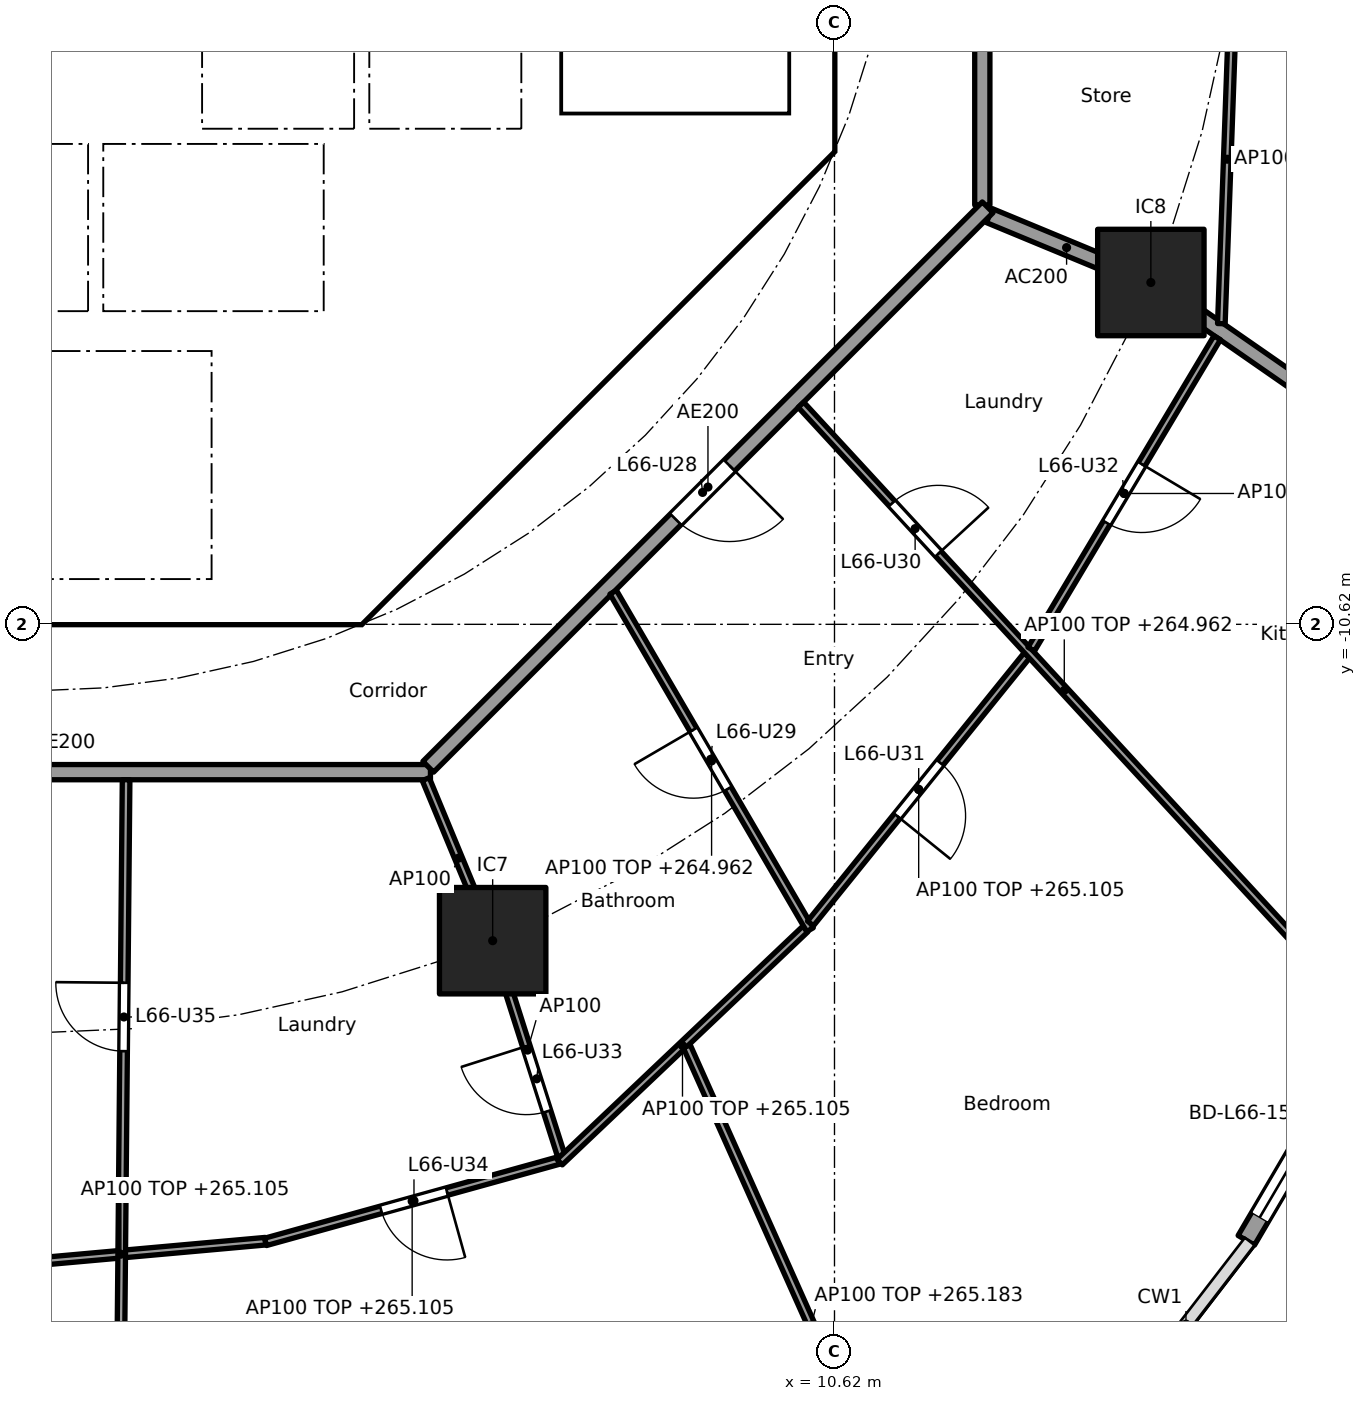
"""IFC4 building model, lengths in metres.
Left out: names, types, materials, properties, quantities, classifications, styles, units other than length and angle.
Written with IfcOpenShell. Run it as: python <this file> out.ifc"""

import sys

from ifc_helpers import new_model, si_unit, direction, frame, frame_2d, origin, origin_2d, place, context, subcontext, project, spatial, polyline, rectangle, outline, extrude, element, fill, save


model = new_model("IFC4")
c1 = context("Model", 3, precision=1e-05, world=origin(), true_north=direction((0.0, 1.0)))
c2 = subcontext(c1, "Body", "Model", "MODEL_VIEW")
j1 = project(units=[si_unit("LENGTHUNIT", "METRE"), si_unit("PLANEANGLEUNIT", "RADIAN")], contexts=[c1])
p1 = place(None, origin())
s1 = spatial("IfcSite", under=j1, at=p1, CompositionType="ELEMENT")
p2 = place(p1, origin())
s2 = spatial("IfcBuilding", under=s1, at=p2, CompositionType="ELEMENT")
p3 = place(p2, frame((0.0, 0.0, 262.2)))
s3 = spatial("IfcBuildingStorey", under=s2, at=p3, CompositionType="ELEMENT", Elevation=262.2)
for number, where, z_axis, x_axis in (
    (1, (6.123, -14.782, 0.0), (0.0, 0.0, 1.0), (1.0, 0.0, 0.0)),
    (2, (14.782, -6.123, 0.0), (0.0, 0.0, 1.0), (1.0, 0.0, 0.0)),
):
    element("IfcColumn", number, at=place(p3, frame(where, z_axis=z_axis, x_axis=x_axis)), inside=s3, PredefinedType="COLUMN", context=c2, shape_type="SweptSolid", body=[
        extrude(rectangle(XDim=1.4, YDim=1.4, at=origin_2d()), origin(), (0.0, 0.0, 1.0), 3.7),
    ])
p4 = place(p3, frame((17.454, -16.312, 0.0), z_axis=(0.0, 0.0, 1.0), x_axis=(-0.506371364425, -0.862315511452, 0.0)))
e3 = element("IfcWall", 3, at=p4, inside=s3, PredefinedType="SOLIDWALL", context=c2, shape_type="SweptSolid", body=[
    extrude(rectangle(XDim=2.796, YDim=0.25, at=frame_2d((1.398, 0.0))), origin(), (0.0, 0.0, 1.0), 3.44),
])
p5 = place(p4, frame((0.348, 0.0, 0.0)))
e4 = element("IfcOpeningElement", 4, at=p5, cuts=e3, PredefinedType="OPENING", context=c2, shape_type="SweptSolid", body=[
    extrude(rectangle(XDim=2.1, YDim=2.4, at=frame_2d((1.05, 1.2))), frame((0.0, 0.135, 0.0), z_axis=(0.0, -1.0, 0.0), x_axis=(1.0, 0.0, 0.0)), (0.0, 0.0, 1.0), 0.27),
])
p6 = place(p3, frame((4.613, -9.988, 0.0), z_axis=(0.0, 0.0, 1.0), x_axis=(0.707106781187, 0.707106781187, 0.0)))
e5 = element("IfcWall", 5, at=p6, inside=s3, PredefinedType="SHEAR", context=c2, shape_type="SweptSolid", body=[
    extrude(rectangle(XDim=7.602, YDim=0.6, at=frame_2d((3.801, 0.0))), origin(), (0.0, 0.0, 1.0), 3.44),
])
p7 = place(p6, frame((3.201, 0.0, 0.0)))
e6 = element("IfcOpeningElement", 6, at=p7, cuts=e5, PredefinedType="OPENING", context=c2, shape_type="SweptSolid", body=[
    extrude(rectangle(XDim=1.2, YDim=2.1, at=frame_2d((0.6, 1.05))), frame((0.0, 0.31, 0.0), z_axis=(0.0, -1.0, 0.0), x_axis=(1.0, 0.0, 0.0)), (0.0, 0.0, 1.0), 0.62),
])
p8 = place(p3, frame((4.0, -10.025, 0.0), z_axis=(0.0, 0.0, 1.0), x_axis=(0.0, 1.0, 0.0)))
e7 = element("IfcWall", 7, at=p8, inside=s3, PredefinedType="SOLIDWALL", context=c2, shape_type="SweptSolid", body=[
    extrude(rectangle(XDim=3.0, YDim=0.2, at=frame_2d((1.5, 0.0))), origin(), (0.0, 0.0, 1.0), 3.44),
])
p9 = place(p8, frame((0.975, 0.0, 0.0)))
e8 = element("IfcOpeningElement", 8, at=p9, cuts=e7, PredefinedType="OPENING", context=c2, shape_type="SweptSolid", body=[
    extrude(rectangle(XDim=1.1, YDim=2.1, at=frame_2d((0.55, 1.05))), frame((0.0, 0.11, 0.0), z_axis=(0.0, -1.0, 0.0), x_axis=(1.0, 0.0, 0.0)), (0.0, 0.0, 1.0), 0.22),
])
p10 = place(p3, frame((4.0, -6.5, 0.0), z_axis=(0.0, 0.0, 1.0), x_axis=(0.0, 1.0, 0.0)))
e9 = element("IfcWall", 9, at=p10, inside=s3, PredefinedType="SOLIDWALL", context=c2, shape_type="SweptSolid", body=[
    extrude(rectangle(XDim=2.2, YDim=0.2, at=frame_2d((1.1, 0.0))), origin(), (0.0, 0.0, 1.0), 3.44),
])
p11 = place(p10, frame((0.55, 0.0, 0.0)))
e10 = element("IfcOpeningElement", 10, at=p11, cuts=e9, PredefinedType="OPENING", context=c2, shape_type="SweptSolid", body=[
    extrude(rectangle(XDim=1.1, YDim=2.1, at=frame_2d((0.55, 1.05))), frame((0.0, 0.11, 0.0), z_axis=(0.0, -1.0, 0.0), x_axis=(1.0, 0.0, 0.0)), (0.0, 0.0, 1.0), 0.22),
])
p12 = place(p3, origin())
e11 = element("IfcWall", 11, at=p12, inside=s3, PredefinedType="SHEAR", context=c2, shape_type="SweptSolid", body=[
    extrude(outline(polyline([(-4.152, -10.025), (4.152, -10.025), (4.401, -9.776), (4.825, -10.2), (4.401, -10.625), (-4.401, -10.625), (-4.825, -10.2), (-4.401, -9.776), (-4.152, -10.025)])), origin(), (0.0, 0.0, 1.0), 3.44),
])
p13 = place(p3, origin())
e12 = element("IfcWall", 12, at=p13, inside=s3, PredefinedType="SHEAR", context=c2, shape_type="SweptSolid", body=[
    extrude(outline(polyline([(9.776, -4.401), (10.025, -4.152), (10.025, -3.801), (10.025, 4.152), (9.776, 4.401), (10.2, 4.825), (10.625, 4.401), (10.625, -4.401), (10.2, -4.825), (9.776, -4.401)])), origin(), (0.0, 0.0, 1.0), 3.44),
])
p14 = place(p3, frame((0.9, -6.5, 0.0), z_axis=(0.0, 0.0, 1.0), x_axis=(0.0, 1.0, 0.0)))
e13 = element("IfcWall", 13, at=p14, inside=s3, PredefinedType="SOLIDWALL", context=c2, shape_type="SweptSolid", body=[
    extrude(rectangle(XDim=2.2, YDim=0.2, at=frame_2d((1.1, 0.0))), origin(), (0.0, 0.0, 1.0), 3.44),
])
p15 = place(p3, origin())
e14 = element("IfcWall", 14, at=p15, inside=s3, PredefinedType="SOLIDWALL", context=c2, shape_type="SweptSolid", body=[
    extrude(outline(polyline([(-6.7, -2.1), (-6.5, -2.1), (-6.5, -4.1), (-2.3, -4.1), (-2.3, -2.1), (-2.1, -2.1), (-2.1, -4.1), (2.1, -4.1), (2.1, -2.1), (2.3, -2.1), (2.3, -4.1), (4.3, -4.1), (4.3, -2.1), (4.5, -2.1), (4.5, -4.1), (6.5, -4.1), (6.5, -2.1), (6.7, -2.1), (6.7, -4.3), (-6.7, -4.3), (-6.7, -2.1)])), origin(), (0.0, 0.0, 1.0), 3.44),
])
p16 = place(p3, origin())
e15 = element("IfcWall", 15, at=p16, inside=s3, PredefinedType="SOLIDWALL", context=c2, shape_type="SweptSolid", body=[
    extrude(outline(polyline([(4.1, -7.025), (-4.1, -7.025), (-4.1, -6.5), (4.1, -6.5), (4.1, -7.025)])), origin(), (0.0, 0.0, 1.0), 3.44),
])
p17 = place(p3, origin())
e16 = element("IfcWall", 16, at=p17, inside=s3, PredefinedType="SOLIDWALL", context=c2, shape_type="SweptSolid", body=[
    extrude(outline(polyline([(7.025, -3.9), (6.7, -3.9), (6.7, 3.9), (7.025, 3.9), (7.025, -3.9)])), origin(), (0.0, 0.0, 1.0), 3.44),
])
p18 = place(p3, origin())
e17 = element("IfcWall", 17, at=p18, inside=s3, PredefinedType="SOLIDWALL", context=c2, shape_type="SweptSolid", body=[
    extrude(outline(polyline([(10.025, -4.1), (6.7, -4.1), (6.7, -3.9), (10.025, -3.9), (10.025, -4.1)])), origin(), (0.0, 0.0, 1.0), 3.44),
])
p19 = place(p3, frame((12.657, -5.243, 0.0), z_axis=(0.0, 0.0, 1.0), x_axis=(0.92383017907, -0.382802560388, 0.0)))
e18 = element("IfcWall", 18, at=p19, inside=s3, PredefinedType="PARTITIONING", context=c2, shape_type="SweptSolid", body=[
    extrude(rectangle(XDim=2.2, YDim=0.2, at=frame_2d((1.1, 0.0))), origin(), (0.0, 0.0, 1.0), 3.44),
])
p20 = place(p3, frame((14.823, -6.151, 0.0), z_axis=(0.0, 0.0, 1.0), x_axis=(0.821435065081, -0.570302054928, 0.0)))
e19 = element("IfcWall", 19, at=p20, inside=s3, PredefinedType="PARTITIONING", context=c2, shape_type="SweptSolid", body=[
    extrude(rectangle(XDim=5.368, YDim=0.2, at=frame_2d((2.684, 0.0))), origin(), (0.0, 0.0, 1.0), 3.44),
])
p21 = place(p3, frame((12.565, -5.104, 0.0), z_axis=(0.0, 0.0, 1.0), x_axis=(0.0, 1.0, 0.0)))
e20 = element("IfcWall", 20, at=p21, inside=s3, PredefinedType="PARTITIONING", context=c2, shape_type="SweptSolid", body=[
    extrude(rectangle(XDim=10.209, YDim=0.2, at=frame_2d((5.104, 0.0))), origin(), (0.0, 0.0, 1.0), 3.44),
])
p22 = place(p21, frame((4.604, 0.0, 0.0)))
e21 = element("IfcOpeningElement", 21, at=p22, cuts=e20, PredefinedType="OPENING", context=c2, shape_type="SweptSolid", body=[
    extrude(rectangle(XDim=1.0, YDim=2.1, at=frame_2d((0.5, 1.05))), frame((0.0, 0.11, 0.0), z_axis=(0.0, -1.0, 0.0), x_axis=(1.0, 0.0, 0.0)), (0.0, 0.0, 1.0), 0.22),
])
p23 = place(p3, frame((-5.104, -12.565, 0.0), z_axis=(0.0, 0.0, 1.0), x_axis=(1.0, 0.0, 0.0)))
e22 = element("IfcWall", 22, at=p23, inside=s3, PredefinedType="PARTITIONING", context=c2, shape_type="SweptSolid", body=[
    extrude(rectangle(XDim=10.409, YDim=0.2, at=frame_2d((5.205, 0.0))), origin(), (0.0, 0.0, 1.0), 3.44),
])
p24 = place(p3, frame((5.275, -12.494, 0.0), z_axis=(0.0, 0.0, 1.0), x_axis=(0.707106781187, 0.707106781187, 0.0)))
e23 = element("IfcWall", 23, at=p24, inside=s3, PredefinedType="PARTITIONING", context=c2, shape_type="SweptSolid", body=[
    extrude(rectangle(XDim=10.409, YDim=0.2, at=frame_2d((5.205, 0.0))), origin(), (0.0, 0.0, 1.0), 3.44),
])
p25 = place(p24, frame((4.604, 0.0, 0.0)))
e24 = element("IfcOpeningElement", 24, at=p25, cuts=e23, PredefinedType="OPENING", context=c2, shape_type="SweptSolid", body=[
    extrude(rectangle(XDim=1.0, YDim=2.1, at=frame_2d((0.5, 1.05))), frame((0.0, 0.11, 0.0), z_axis=(0.0, -1.0, 0.0), x_axis=(1.0, 0.0, 0.0)), (0.0, 0.0, 1.0), 0.22),
])
p26 = place(p3, frame((15.865, -2.338, 0.0), z_axis=(0.0, 0.0, 1.0), x_axis=(-0.035864509465, -0.999356661538, 0.0)))
e25 = element("IfcWall", 25, at=p26, inside=s3, PredefinedType="PARTITIONING", context=c2, shape_type="SweptSolid", body=[
    extrude(rectangle(XDim=4.329, YDim=0.1, at=frame_2d((2.165, 0.0))), origin(), (0.0, 0.0, 1.0), 2.905),
])
p27 = place(p3, frame((-0.67, -19.077, 0.0), z_axis=(0.0, 0.0, 1.0), x_axis=(0.995986472869, 0.089503887414, 0.0)))
e26 = element("IfcWall", 26, at=p27, inside=s3, PredefinedType="PARTITIONING", context=c2, shape_type="SweptSolid", body=[
    extrude(rectangle(XDim=3.819, YDim=0.1, at=frame_2d((1.909, 0.0))), origin(), (0.0, 0.0, 1.0), 2.905),
])
p28 = place(p3, frame((1.3, -12.665, 0.0), z_axis=(0.0, 0.0, 1.0), x_axis=(-0.009254890166, -0.999957172587, 0.0)))
e27 = element("IfcWall", 27, at=p28, inside=s3, PredefinedType="PARTITIONING", context=c2, shape_type="SweptSolid", body=[
    extrude(rectangle(XDim=15.933, YDim=0.1, at=frame_2d((7.967, 0.0))), origin(), (0.0, 0.0, 1.0), 2.762),
])
p29 = place(p28, frame((2.671, 0.0, 0.0)))
e28 = element("IfcOpeningElement", 28, at=p29, cuts=e27, PredefinedType="OPENING", context=c2, shape_type="SweptSolid", body=[
    extrude(rectangle(XDim=0.9, YDim=2.1, at=frame_2d((0.45, 1.05))), frame((0.0, 0.06, 0.0), z_axis=(0.0, -1.0, 0.0), x_axis=(1.0, 0.0, 0.0)), (0.0, 0.0, 1.0), 0.12),
])
p30 = place(p3, frame((3.135, -18.744, 0.0), z_axis=(0.0, 0.0, 1.0), x_axis=(0.963606111552, 0.267326133738, 0.0)))
e29 = element("IfcWall", 29, at=p30, inside=s3, PredefinedType="PARTITIONING", context=c2, shape_type="SweptSolid", body=[
    extrude(rectangle(XDim=4.003, YDim=0.1, at=frame_2d((2.001, 0.0))), origin(), (0.0, 0.0, 1.0), 2.905),
])
p31 = place(p30, frame((1.576, 0.0, 0.0)))
e30 = element("IfcOpeningElement", 30, at=p31, cuts=e29, PredefinedType="OPENING", context=c2, shape_type="SweptSolid", body=[
    extrude(rectangle(XDim=0.9, YDim=2.1, at=frame_2d((0.45, 1.05))), frame((0.0, 0.06, 0.0), z_axis=(0.0, -1.0, 0.0), x_axis=(1.0, 0.0, 0.0)), (0.0, 0.0, 1.0), 0.12),
])
p32 = place(p3, frame((5.243, -12.657, 0.0), z_axis=(0.0, 0.0, 1.0), x_axis=(0.382719158442, -0.923864733477, 0.0)))
e31 = element("IfcWall", 31, at=p32, inside=s3, PredefinedType="PARTITIONING", context=c2, shape_type="SweptSolid", body=[
    extrude(rectangle(XDim=2.25, YDim=0.1, at=frame_2d((1.125, 0.0))), origin(), (0.0, 0.0, 1.0), 3.44),
])
p33 = place(p3, frame((6.138, -14.83, 0.0), z_axis=(0.0, 0.0, 1.0), x_axis=(0.303665801704, -0.952778610631, 0.0)))
e32 = element("IfcWall", 32, at=p33, inside=s3, PredefinedType="PARTITIONING", context=c2, shape_type="SweptSolid", body=[
    extrude(rectangle(XDim=2.922, YDim=0.1, at=frame_2d((1.461, 0.0))), origin(), (0.0, 0.0, 1.0), 3.44),
])
p34 = place(p33, frame((1.407, 0.0, 0.0)))
e33 = element("IfcOpeningElement", 33, at=p34, cuts=e32, PredefinedType="OPENING", context=c2, shape_type="SweptSolid", body=[
    extrude(rectangle(XDim=0.9, YDim=2.1, at=frame_2d((0.45, 1.05))), frame((0.0, 0.06, 0.0), z_axis=(0.0, -1.0, 0.0), x_axis=(1.0, 0.0, 0.0)), (0.0, 0.0, 1.0), 0.12),
])
p35 = place(p3, frame((7.004, -17.695, 0.0), z_axis=(0.0, 0.0, 1.0), x_axis=(0.725438442765, 0.68828705186, 0.0)))
e34 = element("IfcWall", 34, at=p35, inside=s3, PredefinedType="PARTITIONING", context=c2, shape_type="SweptSolid", body=[
    extrude(rectangle(XDim=4.456, YDim=0.1, at=frame_2d((2.228, 0.0))), origin(), (0.0, 0.0, 1.0), 2.905),
])
p36 = place(p3, frame((8.677, -16.173, 0.0), z_axis=(0.0, 0.0, 1.0), x_axis=(0.408174671437, -0.912903849043, 0.0)))
e35 = element("IfcWall", 35, at=p36, inside=s3, PredefinedType="PARTITIONING", context=c2, shape_type="SweptSolid", body=[
    extrude(rectangle(XDim=8.028, YDim=0.1, at=frame_2d((4.014, 0.0))), origin(), (0.0, 0.0, 1.0), 2.983),
])
p37 = place(p3, frame((7.708, -10.198, 0.0), z_axis=(0.0, 0.0, 1.0), x_axis=(0.503838537732, -0.863797851292, 0.0)))
e36 = element("IfcWall", 36, at=p37, inside=s3, PredefinedType="PARTITIONING", context=c2, shape_type="SweptSolid", body=[
    extrude(rectangle(XDim=5.14, YDim=0.1, at=frame_2d((2.57, 0.0))), origin(), (0.0, 0.0, 1.0), 2.762),
])
p38 = place(p37, frame((2.095, 0.0, 0.0)))
e37 = element("IfcOpeningElement", 37, at=p38, cuts=e36, PredefinedType="OPENING", context=c2, shape_type="SweptSolid", body=[
    extrude(rectangle(XDim=0.9, YDim=2.1, at=frame_2d((0.45, 1.05))), frame((0.0, 0.06, 0.0), z_axis=(0.0, -1.0, 0.0), x_axis=(1.0, 0.0, 0.0)), (0.0, 0.0, 1.0), 0.12),
])
p39 = place(p3, frame((10.304, -14.555, 0.0), z_axis=(0.0, 0.0, 1.0), x_axis=(0.628170338674, 0.778075848237, 0.0)))
e38 = element("IfcWall", 38, at=p39, inside=s3, PredefinedType="PARTITIONING", context=c2, shape_type="SweptSolid", body=[
    extrude(rectangle(XDim=4.532, YDim=0.1, at=frame_2d((2.266, 0.0))), origin(), (0.0, 0.0, 1.0), 2.905),
])
p40 = place(p39, frame((1.816, 0.0, 0.0)))
e39 = element("IfcOpeningElement", 39, at=p40, cuts=e38, PredefinedType="OPENING", context=c2, shape_type="SweptSolid", body=[
    extrude(rectangle(XDim=0.9, YDim=2.1, at=frame_2d((0.45, 1.05))), frame((0.0, 0.06, 0.0), z_axis=(0.0, -1.0, 0.0), x_axis=(1.0, 0.0, 0.0)), (0.0, 0.0, 1.0), 0.12),
])
p41 = place(p3, frame((10.179, -7.731, 0.0), z_axis=(0.0, 0.0, 1.0), x_axis=(0.67775318564, -0.73528947997, 0.0)))
e40 = element("IfcWall", 40, at=p41, inside=s3, PredefinedType="PARTITIONING", context=c2, shape_type="SweptSolid", body=[
    extrude(rectangle(XDim=10.222, YDim=0.1, at=frame_2d((5.111, 0.0))), origin(), (0.0, 0.0, 1.0), 2.762),
])
p42 = place(p41, frame((1.766, 0.0, 0.0)))
e41 = element("IfcOpeningElement", 41, at=p42, cuts=e40, PredefinedType="OPENING", context=c2, shape_type="SweptSolid", body=[
    extrude(rectangle(XDim=0.9, YDim=2.1, at=frame_2d((0.45, 1.05))), frame((0.0, 0.06, 0.0), z_axis=(0.0, -1.0, 0.0), x_axis=(1.0, 0.0, 0.0)), (0.0, 0.0, 1.0), 0.12),
])
p43 = place(p3, frame((13.208, -10.947, 0.0), z_axis=(0.0, 0.0, 1.0), x_axis=(0.512726452516, 0.858552028063, 0.0)))
e42 = element("IfcWall", 42, at=p43, inside=s3, PredefinedType="PARTITIONING", context=c2, shape_type="SweptSolid", body=[
    extrude(rectangle(XDim=4.772, YDim=0.1, at=frame_2d((2.386, 0.0))), origin(), (0.0, 0.0, 1.0), 2.905),
])
p44 = place(p43, frame((1.936, 0.0, 0.0)))
e43 = element("IfcOpeningElement", 43, at=p44, cuts=e42, PredefinedType="OPENING", context=c2, shape_type="SweptSolid", body=[
    extrude(rectangle(XDim=0.9, YDim=2.1, at=frame_2d((0.45, 1.05))), frame((0.0, 0.06, 0.0), z_axis=(0.0, -1.0, 0.0), x_axis=(1.0, 0.0, 0.0)), (0.0, 0.0, 1.0), 0.12),
])
p45 = place(p5, origin())
e44 = element("IfcDoor", 44, at=p45, inside=s3, OperationType="SLIDING_TO_LEFT", PredefinedType="DOOR", context=c2, shape_type="SweptSolid", body=[
    extrude(rectangle(XDim=2.1, YDim=2.4, at=frame_2d((1.05, 1.2))), frame((0.0, 0.025, 0.0), z_axis=(0.0, -1.0, 0.0), x_axis=(1.0, 0.0, 0.0)), (0.0, 0.0, 1.0), 0.05),
])
fill(e4, e44)
p46 = place(p11, origin())
e45 = element("IfcDoor", 45, at=p46, inside=s3, OperationType="DOUBLE_DOOR_SLIDING", PredefinedType="DOOR", context=c2, shape_type="SweptSolid", body=[
    extrude(rectangle(XDim=1.1, YDim=2.1, at=frame_2d((0.55, 1.05))), frame((0.0, 0.025, 0.0), z_axis=(0.0, -1.0, 0.0), x_axis=(1.0, 0.0, 0.0)), (0.0, 0.0, 1.0), 0.05),
])
fill(e10, e45)
p47 = place(p9, origin())
e46 = element("IfcDoor", 46, at=p47, inside=s3, OperationType="SINGLE_SWING_LEFT", PredefinedType="DOOR", context=c2, shape_type="SweptSolid", body=[
    extrude(rectangle(XDim=1.1, YDim=2.1, at=frame_2d((0.55, 1.05))), frame((0.0, 0.025, 0.0), z_axis=(0.0, -1.0, 0.0), x_axis=(1.0, 0.0, 0.0)), (0.0, 0.0, 1.0), 0.05),
])
fill(e8, e46)
p48 = place(p7, origin())
e47 = element("IfcDoor", 47, at=p48, inside=s3, OperationType="SINGLE_SWING_RIGHT", PredefinedType="DOOR", context=c2, shape_type="SweptSolid", body=[
    extrude(rectangle(XDim=1.2, YDim=2.1, at=frame_2d((0.6, 1.05))), frame((0.0, 0.025, 0.0), z_axis=(0.0, -1.0, 0.0), x_axis=(1.0, 0.0, 0.0)), (0.0, 0.0, 1.0), 0.05),
])
fill(e6, e47)
p49 = place(p25, frame((1.0, 0.0, 0.0), x_axis=(-1.0, 0.0, 0.0)))
e48 = element("IfcDoor", 48, at=p49, inside=s3, OperationType="SINGLE_SWING_LEFT", PredefinedType="DOOR", context=c2, shape_type="SweptSolid", body=[
    extrude(rectangle(XDim=1.0, YDim=2.1, at=frame_2d((0.5, 1.05))), frame((0.0, 0.025, 0.0), z_axis=(0.0, -1.0, 0.0), x_axis=(1.0, 0.0, 0.0)), (0.0, 0.0, 1.0), 0.05),
])
fill(e24, e48)
p50 = place(p38, frame((0.9, 0.0, 0.0), x_axis=(-1.0, 0.0, 0.0)))
e49 = element("IfcDoor", 49, at=p50, inside=s3, OperationType="SINGLE_SWING_RIGHT", PredefinedType="DOOR", context=c2, shape_type="SweptSolid", body=[
    extrude(rectangle(XDim=0.9, YDim=2.1, at=frame_2d((0.45, 1.05))), frame((0.0, 0.025, 0.0), z_axis=(0.0, -1.0, 0.0), x_axis=(1.0, 0.0, 0.0)), (0.0, 0.0, 1.0), 0.05),
])
fill(e37, e49)
p51 = place(p42, origin())
e50 = element("IfcDoor", 50, at=p51, inside=s3, OperationType="SINGLE_SWING_RIGHT", PredefinedType="DOOR", context=c2, shape_type="SweptSolid", body=[
    extrude(rectangle(XDim=0.9, YDim=2.1, at=frame_2d((0.45, 1.05))), frame((0.0, 0.025, 0.0), z_axis=(0.0, -1.0, 0.0), x_axis=(1.0, 0.0, 0.0)), (0.0, 0.0, 1.0), 0.05),
])
fill(e41, e50)
p52 = place(p40, frame((0.9, 0.0, 0.0), x_axis=(-1.0, 0.0, 0.0)))
e51 = element("IfcDoor", 51, at=p52, inside=s3, OperationType="SINGLE_SWING_RIGHT", PredefinedType="DOOR", context=c2, shape_type="SweptSolid", body=[
    extrude(rectangle(XDim=0.9, YDim=2.1, at=frame_2d((0.45, 1.05))), frame((0.0, 0.025, 0.0), z_axis=(0.0, -1.0, 0.0), x_axis=(1.0, 0.0, 0.0)), (0.0, 0.0, 1.0), 0.05),
])
fill(e39, e51)
p53 = place(p44, frame((0.9, 0.0, 0.0), x_axis=(-1.0, 0.0, 0.0)))
e52 = element("IfcDoor", 52, at=p53, inside=s3, OperationType="SINGLE_SWING_LEFT", PredefinedType="DOOR", context=c2, shape_type="SweptSolid", body=[
    extrude(rectangle(XDim=0.9, YDim=2.1, at=frame_2d((0.45, 1.05))), frame((0.0, 0.025, 0.0), z_axis=(0.0, -1.0, 0.0), x_axis=(1.0, 0.0, 0.0)), (0.0, 0.0, 1.0), 0.05),
])
fill(e43, e52)
p54 = place(p34, frame((0.9, 0.0, 0.0), x_axis=(-1.0, 0.0, 0.0)))
e53 = element("IfcDoor", 53, at=p54, inside=s3, OperationType="SINGLE_SWING_RIGHT", PredefinedType="DOOR", context=c2, shape_type="SweptSolid", body=[
    extrude(rectangle(XDim=0.9, YDim=2.1, at=frame_2d((0.45, 1.05))), frame((0.0, 0.025, 0.0), z_axis=(0.0, -1.0, 0.0), x_axis=(1.0, 0.0, 0.0)), (0.0, 0.0, 1.0), 0.05),
])
fill(e33, e53)
p55 = place(p31, frame((0.9, 0.0, 0.0), x_axis=(-1.0, 0.0, 0.0)))
e54 = element("IfcDoor", 54, at=p55, inside=s3, OperationType="SINGLE_SWING_LEFT", PredefinedType="DOOR", context=c2, shape_type="SweptSolid", body=[
    extrude(rectangle(XDim=0.9, YDim=2.1, at=frame_2d((0.45, 1.05))), frame((0.0, 0.025, 0.0), z_axis=(0.0, -1.0, 0.0), x_axis=(1.0, 0.0, 0.0)), (0.0, 0.0, 1.0), 0.05),
])
fill(e30, e54)
p56 = place(p29, frame((0.9, 0.0, 0.0), x_axis=(-1.0, 0.0, 0.0)))
e55 = element("IfcDoor", 55, at=p56, inside=s3, OperationType="SINGLE_SWING_RIGHT", PredefinedType="DOOR", context=c2, shape_type="SweptSolid", body=[
    extrude(rectangle(XDim=0.9, YDim=2.1, at=frame_2d((0.45, 1.05))), frame((0.0, 0.025, 0.0), z_axis=(0.0, -1.0, 0.0), x_axis=(1.0, 0.0, 0.0)), (0.0, 0.0, 1.0), 0.05),
])
fill(e28, e55)
save(model, sys.argv[1])
